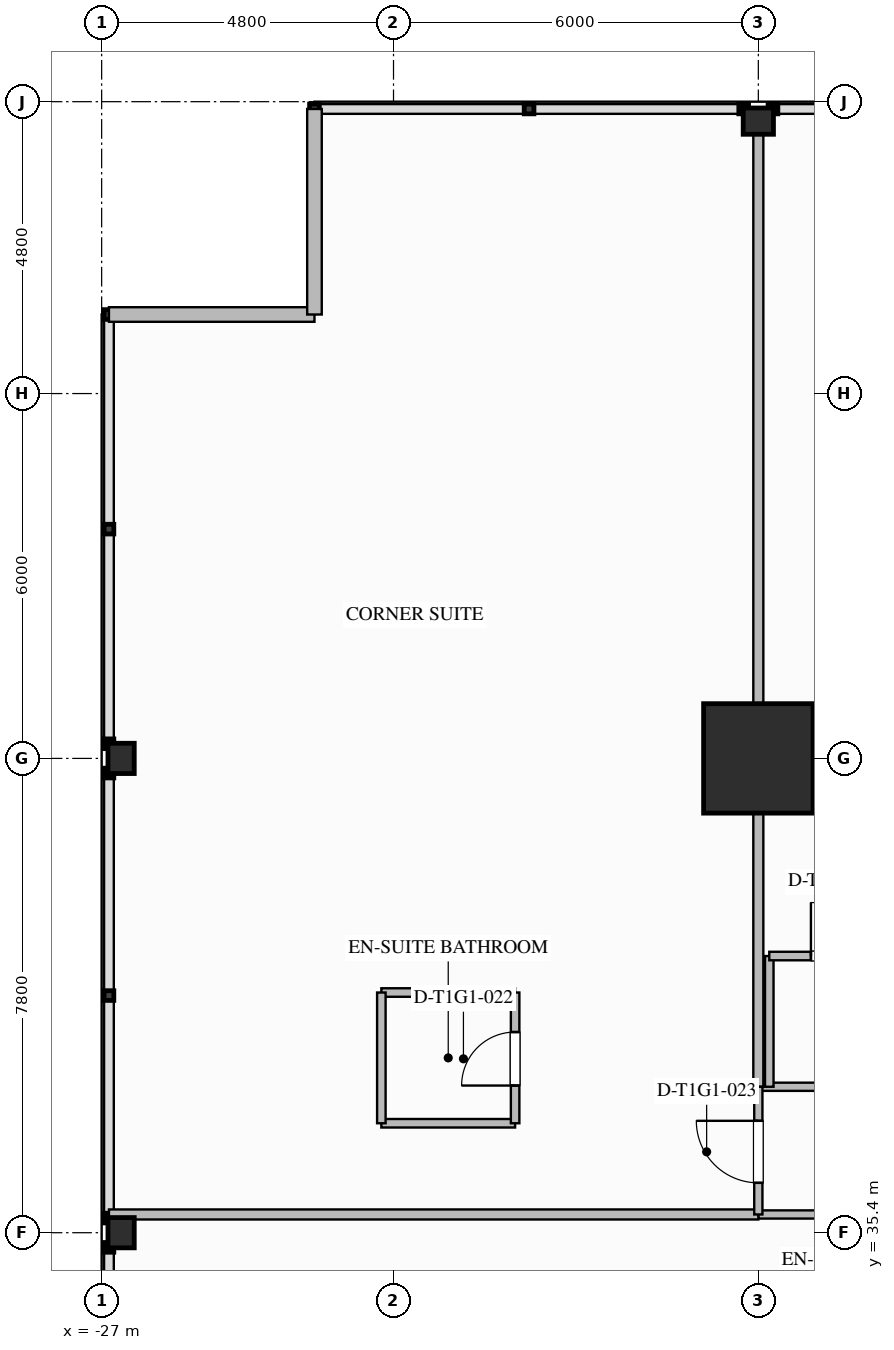
"""IFC4 building model, lengths in metres.
Left out: names, types, materials, properties, quantities, classifications, styles, units other than length and angle.
Written with IfcOpenShell. Run it as: python <this file> out.ifc"""

import sys

from ifc_helpers import new_model, si_unit, direction, frame, frame_2d, origin, origin_2d, place, context, subcontext, project, spatial, rectangle, i_section, extrude, element, fill, save


model = new_model("IFC4")
c1 = context("Model", 3, precision=1e-05, world=origin(), true_north=direction((0.0, 1.0)))
c2 = subcontext(c1, "Body", "Model", "MODEL_VIEW")
j1 = project(units=[si_unit("LENGTHUNIT", "METRE"), si_unit("PLANEANGLEUNIT", "RADIAN")], contexts=[c1])
p1 = place(None, origin())
s1 = spatial("IfcSite", under=j1, at=p1, CompositionType="ELEMENT")
p2 = place(p1, origin())
s2 = spatial("IfcBuilding", under=s1, at=p2, CompositionType="ELEMENT")
p3 = place(p2, frame((0.0, 0.0, 36.7)))
s3 = spatial("IfcBuildingStorey", under=s2, at=p3, CompositionType="ELEMENT", Elevation=36.7)
p4 = place(p3, frame((-16.2, 43.2, 0.0), z_axis=(0.0, 0.0, 1.0), x_axis=(1.0, 0.0, 0.0)))
e1 = element("IfcColumn", 1, at=p4, inside=s3, PredefinedType="COLUMN", context=c2, shape_type="SweptSolid", body=[
    extrude(rectangle(XDim=1.8, YDim=1.8, at=origin_2d()), origin(), (0.0, 0.0, 1.0), 3.5),
])
for number, where, z_axis, x_axis in (
    (2, (-26.68, 35.4, 0.0), (0.0, 0.0, 1.0), (1.0, 0.0, 0.0)),
    (3, (-26.68, 43.2, 0.0), (0.0, 0.0, 1.0), (1.0, 0.0, 0.0)),
    (4, (-16.2, 53.68, 0.0), (0.0, 0.0, 1.0), (0.0, 1.0, 0.0)),
):
    element("IfcColumn", number, at=place(p3, frame(where, z_axis=z_axis, x_axis=x_axis)), inside=s3, PredefinedType="COLUMN", context=c2, shape_type="SweptSolid", body=[
        extrude(i_section(OverallWidth=0.432, OverallDepth=0.498, WebThickness=0.056, FlangeThickness=0.089, FilletRadius=0.03, at=origin_2d()), origin(), (0.0, 0.0, 1.0), 3.497),
    ])
for number, where, z_axis, x_axis in (
    (5, (-26.88, 50.5, 0.0), (0.0, 0.0, 1.0), (1.0, 0.0, 0.0)),
    (6, (-23.5, 50.5, 0.0), (0.0, 0.0, 1.0), (0.0, 1.0, 0.0)),
):
    element("IfcWall", number, at=place(p3, frame(where, z_axis=z_axis, x_axis=x_axis)), inside=s3, PredefinedType="STANDARD", context=c2, shape_type="SweptSolid", body=[
        extrude(rectangle(XDim=3.38, YDim=0.24, at=frame_2d((1.69, 0.0))), origin(), (0.0, 0.0, 1.0), 3.24),
    ])
p5 = place(p3, frame((-16.2, 37.8, 0.0), z_axis=(0.0, 0.0, 1.0), x_axis=(1.0, 0.0, 0.0)))
e7 = element("IfcWall", 7, at=p5, inside=s3, PredefinedType="PARTITIONING", context=c2, shape_type="SweptSolid", body=[
    extrude(rectangle(XDim=32.4, YDim=0.135, at=frame_2d((16.2, 0.0))), origin(), (0.0, 0.0, 1.0), 3.24),
])
p6 = place(p5, frame((3.189, 0.0, 0.0)))
e8 = element("IfcOpeningElement", 8, at=p6, cuts=e7, PredefinedType="OPENING", context=c2, shape_type="SweptSolid", body=[
    extrude(rectangle(XDim=0.96, YDim=2.15, at=frame_2d((0.48, 1.075))), frame((0.0, 0.077, 0.0), z_axis=(0.0, -1.0, 0.0), x_axis=(1.0, 0.0, 0.0)), (0.0, 0.0, 1.0), 0.155),
])
p7 = place(p5, frame((8.229, 0.0, 0.0)))
e9 = element("IfcOpeningElement", 9, at=p7, cuts=e7, PredefinedType="OPENING", context=c2, shape_type="SweptSolid", body=[
    extrude(rectangle(XDim=1.26, YDim=2.2, at=frame_2d((0.63, 1.1))), frame((0.0, 0.077, 0.0), z_axis=(0.0, -1.0, 0.0), x_axis=(1.0, 0.0, 0.0)), (0.0, 0.0, 1.0), 0.155),
])
p8 = place(p5, frame((12.78, 0.0, 0.0)))
e10 = element("IfcOpeningElement", 10, at=p8, cuts=e7, PredefinedType="OPENING", context=c2, shape_type="SweptSolid", body=[
    extrude(rectangle(XDim=1.02, YDim=2.15, at=frame_2d((0.51, 1.075))), frame((0.0, 0.077, 0.0), z_axis=(0.0, -1.0, 0.0), x_axis=(1.0, 0.0, 0.0)), (0.0, 0.0, 1.0), 0.155),
])
p9 = place(p5, frame((19.425, 0.0, 0.0)))
e11 = element("IfcOpeningElement", 11, at=p9, cuts=e7, PredefinedType="OPENING", context=c2, shape_type="SweptSolid", body=[
    extrude(rectangle(XDim=0.96, YDim=2.15, at=frame_2d((0.48, 1.075))), frame((0.0, 0.077, 0.0), z_axis=(0.0, -1.0, 0.0), x_axis=(1.0, 0.0, 0.0)), (0.0, 0.0, 1.0), 0.155),
])
p10 = place(p5, frame((24.92, 0.0, 0.0)))
e12 = element("IfcOpeningElement", 12, at=p10, cuts=e7, PredefinedType="OPENING", context=c2, shape_type="SweptSolid", body=[
    extrude(rectangle(XDim=1.26, YDim=2.2, at=frame_2d((0.63, 1.1))), frame((0.0, 0.077, 0.0), z_axis=(0.0, -1.0, 0.0), x_axis=(1.0, 0.0, 0.0)), (0.0, 0.0, 1.0), 0.155),
])
p11 = place(p5, frame((30.68, 0.0, 0.0)))
e13 = element("IfcOpeningElement", 13, at=p11, cuts=e7, PredefinedType="OPENING", context=c2, shape_type="SweptSolid", body=[
    extrude(rectangle(XDim=0.96, YDim=2.15, at=frame_2d((0.48, 1.075))), frame((0.0, 0.077, 0.0), z_axis=(0.0, -1.0, 0.0), x_axis=(1.0, 0.0, 0.0)), (0.0, 0.0, 1.0), 0.155),
])
p12 = place(p3, frame((-16.2, 35.7, 0.0), z_axis=(0.0, 0.0, 1.0), x_axis=(1.0, 0.0, 0.0)))
e14 = element("IfcWall", 14, at=p12, inside=s3, PredefinedType="PARTITIONING", context=c2, shape_type="SweptSolid", body=[
    extrude(rectangle(XDim=5.4, YDim=0.135, at=frame_2d((2.7, 0.0))), origin(), (0.0, 0.0, 1.0), 3.24),
])
p13 = place(p3, frame((-16.2, 37.8, 0.0), z_axis=(0.0, 0.0, 1.0), x_axis=(0.0, 1.0, 0.0)))
e15 = element("IfcWall", 15, at=p13, inside=s3, PredefinedType="PARTITIONING", context=c2, shape_type="SweptSolid", body=[
    extrude(rectangle(XDim=16.08, YDim=0.165, at=frame_2d((8.04, 0.0))), origin(), (0.0, 0.0, 1.0), 2.298),
])
p14 = place(p3, frame((-26.88, 35.7, 0.0), z_axis=(0.0, 0.0, 1.0), x_axis=(1.0, 0.0, 0.0)))
e16 = element("IfcWall", 16, at=p14, inside=s3, PredefinedType="PARTITIONING", context=c2, shape_type="SweptSolid", body=[
    extrude(rectangle(XDim=10.68, YDim=0.165, at=frame_2d((5.34, 0.0))), origin(), (0.0, 0.0, 1.0), 2.298),
])
p15 = place(p3, frame((-16.2, 35.7, 0.0), z_axis=(0.0, 0.0, 1.0), x_axis=(0.0, 1.0, 0.0)))
e17 = element("IfcWall", 17, at=p15, inside=s3, PredefinedType="PARTITIONING", context=c2, shape_type="SweptSolid", body=[
    extrude(rectangle(XDim=2.1, YDim=0.135, at=frame_2d((1.05, 0.0))), origin(), (0.0, 0.0, 1.0), 2.298),
])
p16 = place(p15, frame((0.52, 0.0, 0.0)))
e18 = element("IfcOpeningElement", 18, at=p16, cuts=e17, PredefinedType="OPENING", context=c2, shape_type="SweptSolid", body=[
    extrude(rectangle(XDim=1.02, YDim=2.15, at=frame_2d((0.51, 1.075))), frame((0.0, 0.077, 0.0), z_axis=(0.0, -1.0, 0.0), x_axis=(1.0, 0.0, 0.0)), (0.0, 0.0, 1.0), 0.155),
])
for number, where, z_axis, x_axis in (
    (19, (-22.4, 37.2, 0.0), (0.0, 0.0, 1.0), (1.0, 0.0, 0.0)),
    (20, (-22.4, 39.35, 0.0), (0.0, 0.0, 1.0), (1.0, 0.0, 0.0)),
):
    element("IfcWall", number, at=place(p3, frame(where, z_axis=z_axis, x_axis=x_axis)), inside=s3, PredefinedType="PLUMBINGWALL", context=c2, shape_type="SweptSolid", body=[
        extrude(rectangle(XDim=2.2, YDim=0.14, at=frame_2d((1.1, 0.0))), origin(), (0.0, 0.0, 1.0), 3.24),
    ])
p17 = place(p3, frame((-22.4, 37.2, 0.0), z_axis=(0.0, 0.0, 1.0), x_axis=(0.0, 1.0, 0.0)))
e21 = element("IfcWall", 21, at=p17, inside=s3, PredefinedType="PLUMBINGWALL", context=c2, shape_type="SweptSolid", body=[
    extrude(rectangle(XDim=2.15, YDim=0.14, at=frame_2d((1.075, 0.0))), origin(), (0.0, 0.0, 1.0), 3.24),
])
p18 = place(p3, frame((-20.2, 37.2, 0.0), z_axis=(0.0, 0.0, 1.0), x_axis=(0.0, 1.0, 0.0)))
e22 = element("IfcWall", 22, at=p18, inside=s3, PredefinedType="PLUMBINGWALL", context=c2, shape_type="SweptSolid", body=[
    extrude(rectangle(XDim=2.15, YDim=0.14, at=frame_2d((1.075, 0.0))), origin(), (0.0, 0.0, 1.0), 3.24),
])
p19 = place(p18, frame((0.62, 0.0, 0.0)))
e23 = element("IfcOpeningElement", 23, at=p19, cuts=e22, PredefinedType="OPENING", context=c2, shape_type="SweptSolid", body=[
    extrude(rectangle(XDim=0.88, YDim=2.1, at=frame_2d((0.44, 1.05))), frame((0.0, 0.08, 0.0), z_axis=(0.0, -1.0, 0.0), x_axis=(1.0, 0.0, 0.0)), (0.0, 0.0, 1.0), 0.16),
])
p20 = place(p3, frame((-16.02, 37.8, 0.0), z_axis=(0.0, 0.0, 1.0), x_axis=(0.0, 1.0, 0.0)))
e24 = element("IfcWall", 24, at=p20, inside=s3, PredefinedType="PLUMBINGWALL", context=c2, shape_type="SweptSolid", body=[
    extrude(rectangle(XDim=2.15, YDim=0.14, at=frame_2d((1.075, 0.0))), origin(), (0.0, 0.0, 1.0), 2.298),
])
p21 = place(p3, frame((-16.02, 39.95, 0.0), z_axis=(0.0, 0.0, 1.0), x_axis=(1.0, 0.0, 0.0)))
e25 = element("IfcWall", 25, at=p21, inside=s3, PredefinedType="PLUMBINGWALL", context=c2, shape_type="SweptSolid", body=[
    extrude(rectangle(XDim=2.25, YDim=0.14, at=frame_2d((1.125, 0.0))), origin(), (0.0, 0.0, 1.0), 3.24),
])
p22 = place(p21, frame((0.685, 0.0, 0.0)))
e26 = element("IfcOpeningElement", 26, at=p22, cuts=e25, PredefinedType="OPENING", context=c2, shape_type="SweptSolid", body=[
    extrude(rectangle(XDim=0.88, YDim=2.1, at=frame_2d((0.44, 1.05))), frame((0.0, 0.08, 0.0), z_axis=(0.0, -1.0, 0.0), x_axis=(1.0, 0.0, 0.0)), (0.0, 0.0, 1.0), 0.16),
])
p23 = place(p19, origin())
e27 = element("IfcDoor", 27, at=p23, inside=s3, OperationType="SINGLE_SWING_LEFT", PredefinedType="DOOR", context=c2, shape_type="SweptSolid", body=[
    extrude(rectangle(XDim=0.88, YDim=2.1, at=frame_2d((0.44, 1.05))), frame((0.0, 0.025, 0.0), z_axis=(0.0, -1.0, 0.0), x_axis=(1.0, 0.0, 0.0)), (0.0, 0.0, 1.0), 0.05),
])
fill(e23, e27)
p24 = place(p16, origin())
e28 = element("IfcDoor", 28, at=p24, inside=s3, OperationType="SINGLE_SWING_RIGHT", PredefinedType="DOOR", context=c2, shape_type="SweptSolid", body=[
    extrude(rectangle(XDim=1.02, YDim=2.15, at=frame_2d((0.51, 1.075))), frame((0.0, 0.025, 0.0), z_axis=(0.0, -1.0, 0.0), x_axis=(1.0, 0.0, 0.0)), (0.0, 0.0, 1.0), 0.05),
])
fill(e18, e28)
p25 = place(p22, origin())
e29 = element("IfcDoor", 29, at=p25, inside=s3, OperationType="SINGLE_SWING_LEFT", PredefinedType="DOOR", context=c2, shape_type="SweptSolid", body=[
    extrude(rectangle(XDim=0.88, YDim=2.1, at=frame_2d((0.44, 1.05))), frame((0.0, 0.025, 0.0), z_axis=(0.0, -1.0, 0.0), x_axis=(1.0, 0.0, 0.0)), (0.0, 0.0, 1.0), 0.05),
])
fill(e26, e29)
save(model, sys.argv[1])
